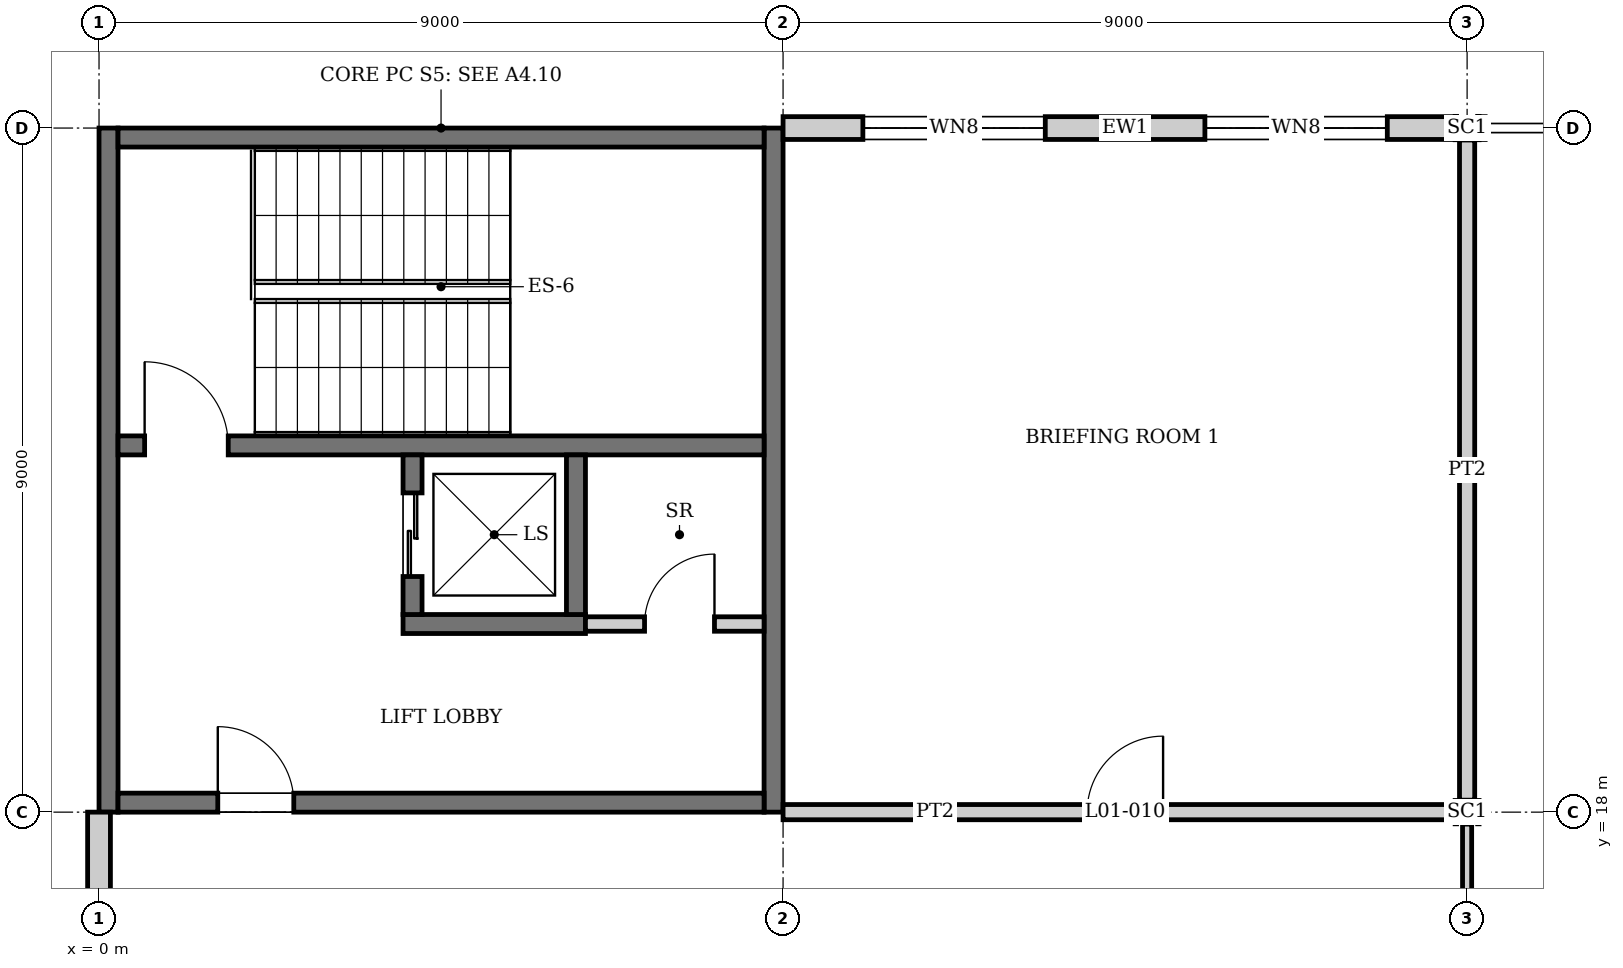
"""IFC4 building model, lengths in metres.
Left out: names, types, materials, properties, quantities, classifications, styles, units other than length and angle.
Written with IfcOpenShell. Run it as: python <this file> out.ifc"""

import sys

from ifc_helpers import new_model, si_unit, direction, frame, frame_2d, origin, origin_2d, place, context, subcontext, project, spatial, rectangle, i_section, extrude, element, fill, save


model = new_model("IFC4")
c1 = context("Model", 3, precision=1e-05, world=origin(), true_north=direction((0.0, 1.0)))
c2 = subcontext(c1, "Body", "Model", "MODEL_VIEW")
j1 = project(units=[si_unit("LENGTHUNIT", "METRE"), si_unit("PLANEANGLEUNIT", "RADIAN")], contexts=[c1])
p1 = place(None, origin())
s1 = spatial("IfcSite", under=j1, at=p1, CompositionType="ELEMENT")
p2 = place(p1, origin())
s2 = spatial("IfcBuilding", under=s1, at=p2, CompositionType="ELEMENT")
p3 = place(p2, frame((0.0, 0.0, 6.0)))
s3 = spatial("IfcBuildingStorey", under=s2, at=p3, CompositionType="ELEMENT", Elevation=6.0)
for number, where, z_axis, x_axis in (
    (1, (18.0, 18.0, 0.0), (0.0, 0.0, 1.0), (0.0, 1.0, 0.0)),
    (2, (18.0, 27.0, 0.0), (0.0, 0.0, 1.0), (0.0, 1.0, 0.0)),
):
    element("IfcColumn", number, at=place(p3, frame(where, z_axis=z_axis, x_axis=x_axis)), inside=s3, PredefinedType="COLUMN", context=c2, shape_type="SweptSolid", body=[
        extrude(i_section(OverallWidth=0.307, OverallDepth=0.315, WebThickness=0.012, FlangeThickness=0.019, at=origin_2d()), origin(), (0.0, 0.0, 1.0), 4.5),
    ])
for number, where, z_axis, x_axis in (
    (3, (0.125, 18.0, 0.0), (0.0, 0.0, 1.0), (0.0, 1.0, 0.0)),
    (4, (8.875, 18.0, 0.0), (0.0, 0.0, 1.0), (0.0, 1.0, 0.0)),
):
    element("IfcWall", number, at=place(p3, frame(where, z_axis=z_axis, x_axis=x_axis)), inside=s3, PredefinedType="SHEAR", context=c2, shape_type="SweptSolid", body=[
        extrude(rectangle(XDim=9.0, YDim=0.25, at=frame_2d((4.5, 0.0))), origin(), (0.0, 0.0, 1.0), 4.5),
    ])
p4 = place(p3, frame((0.25, 18.125, 0.0), z_axis=(0.0, 0.0, 1.0), x_axis=(1.0, 0.0, 0.0)))
e5 = element("IfcWall", 5, at=p4, inside=s3, PredefinedType="SHEAR", context=c2, shape_type="SweptSolid", body=[
    extrude(rectangle(XDim=8.5, YDim=0.25, at=frame_2d((4.25, 0.0))), origin(), (0.0, 0.0, 1.0), 4.5),
])
p5 = place(p4, frame((1.312, 0.0, 0.0)))
e6 = element("IfcOpeningElement", 6, at=p5, cuts=e5, PredefinedType="OPENING", context=c2, shape_type="SweptSolid", body=[
    extrude(rectangle(XDim=1.0, YDim=2.1, at=frame_2d((0.5, 1.05))), frame((0.0, 0.135, 0.0), z_axis=(0.0, -1.0, 0.0), x_axis=(1.0, 0.0, 0.0)), (0.0, 0.0, 1.0), 0.27),
])
p6 = place(p3, frame((0.25, 26.875, 0.0), z_axis=(0.0, 0.0, 1.0), x_axis=(1.0, 0.0, 0.0)))
e7 = element("IfcWall", 7, at=p6, inside=s3, PredefinedType="SHEAR", context=c2, shape_type="SweptSolid", body=[
    extrude(rectangle(XDim=8.5, YDim=0.25, at=frame_2d((4.25, 0.0))), origin(), (0.0, 0.0, 1.0), 4.5),
])
p7 = place(p3, frame((9.0, 27.0, 0.0), z_axis=(0.0, 0.0, 1.0), x_axis=(1.0, 0.0, 0.0)))
e8 = element("IfcWall", 8, at=p7, inside=s3, PredefinedType="SOLIDWALL", context=c2, shape_type="SweptSolid", body=[
    extrude(rectangle(XDim=8.843, YDim=0.3, at=frame_2d((4.421, 0.0))), origin(), (0.0, 0.0, 1.0), 3.991),
])
p8 = place(p7, frame((1.05, 0.0, 0.9)))
e9 = element("IfcOpeningElement", 9, at=p8, cuts=e8, PredefinedType="OPENING", context=c2, shape_type="SweptSolid", body=[
    extrude(rectangle(XDim=2.4, YDim=2.1, at=frame_2d((1.2, 1.05))), frame((0.0, 0.16, 0.0), z_axis=(0.0, -1.0, 0.0), x_axis=(1.0, 0.0, 0.0)), (0.0, 0.0, 1.0), 0.32),
])
p9 = place(p7, frame((5.55, 0.0, 0.9)))
e10 = element("IfcOpeningElement", 10, at=p9, cuts=e8, PredefinedType="OPENING", context=c2, shape_type="SweptSolid", body=[
    extrude(rectangle(XDim=2.4, YDim=2.1, at=frame_2d((1.2, 1.05))), frame((0.0, 0.16, 0.0), z_axis=(0.0, -1.0, 0.0), x_axis=(1.0, 0.0, 0.0)), (0.0, 0.0, 1.0), 0.32),
])
p10 = place(p3, frame((0.0, 9.128, 0.0), z_axis=(0.0, 0.0, 1.0), x_axis=(0.0, 1.0, 0.0)))
e11 = element("IfcWall", 11, at=p10, inside=s3, PredefinedType="SOLIDWALL", context=c2, shape_type="SweptSolid", body=[
    extrude(rectangle(XDim=8.872, YDim=0.3, at=frame_2d((4.436, 0.0))), origin(), (0.0, 0.0, 1.0), 3.947),
])
p11 = place(p10, frame((1.222, 0.0, 0.9)))
e12 = element("IfcOpeningElement", 12, at=p11, cuts=e11, PredefinedType="OPENING", context=c2, shape_type="SweptSolid", body=[
    extrude(rectangle(XDim=1.8, YDim=2.4, at=frame_2d((0.9, 1.2))), frame((0.0, 0.16, 0.0), z_axis=(0.0, -1.0, 0.0), x_axis=(1.0, 0.0, 0.0)), (0.0, 0.0, 1.0), 0.32),
])
p12 = place(p10, frame((5.722, 0.0, 0.9)))
e13 = element("IfcOpeningElement", 13, at=p12, cuts=e11, PredefinedType="OPENING", context=c2, shape_type="SweptSolid", body=[
    extrude(rectangle(XDim=1.8, YDim=2.4, at=frame_2d((0.9, 1.2))), frame((0.0, 0.16, 0.0), z_axis=(0.0, -1.0, 0.0), x_axis=(1.0, 0.0, 0.0)), (0.0, 0.0, 1.0), 0.32),
])
p13 = place(p3, frame((0.25, 22.825, 0.0), z_axis=(0.0, 0.0, 1.0), x_axis=(1.0, 0.0, 0.0)))
e14 = element("IfcWall", 14, at=p13, inside=s3, PredefinedType="SOLIDWALL", context=c2, shape_type="SweptSolid", body=[
    extrude(rectangle(XDim=8.5, YDim=0.25, at=frame_2d((4.25, 0.0))), origin(), (0.0, 0.0, 1.0), 4.25),
])
p14 = place(p13, frame((0.35, 0.0, 0.0)))
e15 = element("IfcOpeningElement", 15, at=p14, cuts=e14, PredefinedType="OPENING", context=c2, shape_type="SweptSolid", body=[
    extrude(rectangle(XDim=1.1, YDim=2.1, at=frame_2d((0.55, 1.05))), frame((0.0, 0.135, 0.0), z_axis=(0.0, -1.0, 0.0), x_axis=(1.0, 0.0, 0.0)), (0.0, 0.0, 1.0), 0.27),
])
p15 = place(p3, frame((4.0, 20.475, 0.0), z_axis=(0.0, 0.0, 1.0), x_axis=(1.0, 0.0, 0.0)))
e16 = element("IfcWall", 16, at=p15, inside=s3, PredefinedType="SOLIDWALL", context=c2, shape_type="SweptSolid", body=[
    extrude(rectangle(XDim=2.4, YDim=0.25, at=frame_2d((1.2, 0.0))), origin(), (0.0, 0.0, 1.0), 4.5),
])
p16 = place(p3, frame((4.125, 20.6, 0.0), z_axis=(0.0, 0.0, 1.0), x_axis=(0.0, 1.0, 0.0)))
e17 = element("IfcWall", 17, at=p16, inside=s3, PredefinedType="SOLIDWALL", context=c2, shape_type="SweptSolid", body=[
    extrude(rectangle(XDim=2.1, YDim=0.25, at=frame_2d((1.05, 0.0))), origin(), (0.0, 0.0, 1.0), 4.5),
])
p17 = place(p16, frame((0.5, 0.0, 0.0)))
e18 = element("IfcOpeningElement", 18, at=p17, cuts=e17, PredefinedType="OPENING", context=c2, shape_type="SweptSolid", body=[
    extrude(rectangle(XDim=1.1, YDim=2.1, at=frame_2d((0.55, 1.05))), frame((0.0, 0.135, 0.0), z_axis=(0.0, -1.0, 0.0), x_axis=(1.0, 0.0, 0.0)), (0.0, 0.0, 1.0), 0.27),
])
p18 = place(p3, frame((6.275, 20.6, 0.0), z_axis=(0.0, 0.0, 1.0), x_axis=(0.0, 1.0, 0.0)))
e19 = element("IfcWall", 19, at=p18, inside=s3, PredefinedType="SOLIDWALL", context=c2, shape_type="SweptSolid", body=[
    extrude(rectangle(XDim=2.1, YDim=0.25, at=frame_2d((1.05, 0.0))), origin(), (0.0, 0.0, 1.0), 4.5),
])
p19 = place(p3, frame((9.0, 18.0, 0.0), z_axis=(0.0, 0.0, 1.0), x_axis=(1.0, 0.0, 0.0)))
e20 = element("IfcWall", 20, at=p19, inside=s3, PredefinedType="PARTITIONING", context=c2, shape_type="SweptSolid", body=[
    extrude(rectangle(XDim=8.843, YDim=0.2, at=frame_2d((4.421, 0.0))), origin(), (0.0, 0.0, 1.0), 3.822),
])
p20 = place(p19, frame((4.0, 0.0, 0.0)))
e21 = element("IfcOpeningElement", 21, at=p20, cuts=e20, PredefinedType="OPENING", context=c2, shape_type="SweptSolid", body=[
    extrude(rectangle(XDim=1.0, YDim=2.1, at=frame_2d((0.5, 1.05))), frame((0.0, 0.11, 0.0), z_axis=(0.0, -1.0, 0.0), x_axis=(1.0, 0.0, 0.0)), (0.0, 0.0, 1.0), 0.22),
])
p21 = place(p3, frame((6.4, 20.475, 0.0), z_axis=(0.0, 0.0, 1.0), x_axis=(1.0, 0.0, 0.0)))
e22 = element("IfcWall", 22, at=p21, inside=s3, PredefinedType="PARTITIONING", context=c2, shape_type="SweptSolid", body=[
    extrude(rectangle(XDim=2.35, YDim=0.19, at=frame_2d((1.175, 0.0))), origin(), (0.0, 0.0, 1.0), 4.25),
])
p22 = place(p21, frame((0.778, 0.0, 0.0)))
e23 = element("IfcOpeningElement", 23, at=p22, cuts=e22, PredefinedType="OPENING", context=c2, shape_type="SweptSolid", body=[
    extrude(rectangle(XDim=0.92, YDim=2.1, at=frame_2d((0.46, 1.05))), frame((0.0, 0.105, 0.0), z_axis=(0.0, -1.0, 0.0), x_axis=(1.0, 0.0, 0.0)), (0.0, 0.0, 1.0), 0.21),
])
p23 = place(p3, frame((18.0, 9.0, 0.0), z_axis=(0.0, 0.0, 1.0), x_axis=(0.0, 1.0, 0.0)))
e24 = element("IfcWall", 24, at=p23, inside=s3, PredefinedType="PARTITIONING", context=c2, shape_type="SweptSolid", body=[
    extrude(rectangle(XDim=8.843, YDim=0.12, at=frame_2d((4.421, 0.0))), origin(), (0.0, 0.0, 1.0), 3.991),
])
p24 = place(p23, frame((0.6, 0.0, 0.0)))
e25 = element("IfcOpeningElement", 25, at=p24, cuts=e24, PredefinedType="OPENING", context=c2, shape_type="SweptSolid", body=[
    extrude(rectangle(XDim=1.8, YDim=2.1, at=frame_2d((0.9, 1.05))), frame((0.0, 0.07, 0.0), z_axis=(0.0, -1.0, 0.0), x_axis=(1.0, 0.0, 0.0)), (0.0, 0.0, 1.0), 0.14),
])
p25 = place(p3, frame((18.0, 18.157, 0.0), z_axis=(0.0, 0.0, 1.0), x_axis=(0.0, 1.0, 0.0)))
e26 = element("IfcWall", 26, at=p25, inside=s3, PredefinedType="PARTITIONING", context=c2, shape_type="SweptSolid", body=[
    extrude(rectangle(XDim=8.685, YDim=0.2, at=frame_2d((4.343, 0.0))), origin(), (0.0, 0.0, 1.0), 3.947),
])
p26 = place(p8, origin())
e27 = element("IfcWindow", 27, at=p26, inside=s3, PartitioningType="SINGLE_PANEL", PredefinedType="WINDOW", context=c2, shape_type="SweptSolid", body=[
    extrude(rectangle(XDim=2.4, YDim=2.1, at=frame_2d((1.2, 1.05))), frame((0.0, 0.03, 0.0), z_axis=(0.0, -1.0, 0.0), x_axis=(1.0, 0.0, 0.0)), (0.0, 0.0, 1.0), 0.06),
])
fill(e9, e27)
p27 = place(p9, origin())
e28 = element("IfcWindow", 28, at=p27, inside=s3, PartitioningType="SINGLE_PANEL", PredefinedType="WINDOW", context=c2, shape_type="SweptSolid", body=[
    extrude(rectangle(XDim=2.4, YDim=2.1, at=frame_2d((1.2, 1.05))), frame((0.0, 0.03, 0.0), z_axis=(0.0, -1.0, 0.0), x_axis=(1.0, 0.0, 0.0)), (0.0, 0.0, 1.0), 0.06),
])
fill(e10, e28)
p28 = place(p17, origin())
e29 = element("IfcDoor", 29, at=p28, inside=s3, OperationType="DOUBLE_DOOR_SLIDING", PredefinedType="DOOR", context=c2, shape_type="SweptSolid", body=[
    extrude(rectangle(XDim=1.1, YDim=2.1, at=frame_2d((0.55, 1.05))), frame((0.0, 0.025, 0.0), z_axis=(0.0, -1.0, 0.0), x_axis=(1.0, 0.0, 0.0)), (0.0, 0.0, 1.0), 0.05),
])
fill(e18, e29)
p29 = place(p20, origin())
e30 = element("IfcDoor", 30, at=p29, inside=s3, OperationType="SINGLE_SWING_RIGHT", PredefinedType="DOOR", context=c2, shape_type="SweptSolid", body=[
    extrude(rectangle(XDim=1.0, YDim=2.1, at=frame_2d((0.5, 1.05))), frame((0.0, 0.025, 0.0), z_axis=(0.0, -1.0, 0.0), x_axis=(1.0, 0.0, 0.0)), (0.0, 0.0, 1.0), 0.05),
])
fill(e21, e30)
p30 = place(p14, origin())
e31 = element("IfcDoor", 31, at=p30, inside=s3, OperationType="SINGLE_SWING_LEFT", PredefinedType="DOOR", context=c2, shape_type="SweptSolid", body=[
    extrude(rectangle(XDim=1.1, YDim=2.1, at=frame_2d((0.55, 1.05))), frame((0.0, 0.025, 0.0), z_axis=(0.0, -1.0, 0.0), x_axis=(1.0, 0.0, 0.0)), (0.0, 0.0, 1.0), 0.05),
])
fill(e15, e31)
p31 = place(p5, origin())
e32 = element("IfcDoor", 32, at=p31, inside=s3, OperationType="SINGLE_SWING_LEFT", PredefinedType="DOOR", context=c2, shape_type="SweptSolid", body=[
    extrude(rectangle(XDim=1.0, YDim=2.1, at=frame_2d((0.5, 1.05))), frame((0.0, 0.025, 0.0), z_axis=(0.0, -1.0, 0.0), x_axis=(1.0, 0.0, 0.0)), (0.0, 0.0, 1.0), 0.05),
])
fill(e6, e32)
p32 = place(p22, origin())
e33 = element("IfcDoor", 33, at=p32, inside=s3, OperationType="SINGLE_SWING_RIGHT", PredefinedType="DOOR", context=c2, shape_type="SweptSolid", body=[
    extrude(rectangle(XDim=0.92, YDim=2.1, at=frame_2d((0.46, 1.05))), frame((0.0, 0.025, 0.0), z_axis=(0.0, -1.0, 0.0), x_axis=(1.0, 0.0, 0.0)), (0.0, 0.0, 1.0), 0.05),
])
fill(e23, e33)
save(model, sys.argv[1])
